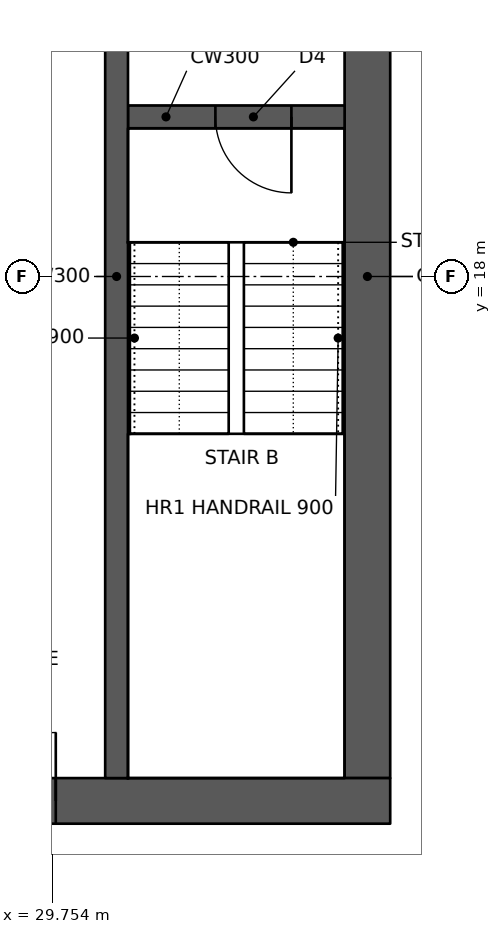
"""IFC4 building model, lengths in metres.
Left out: names, types, materials, properties, quantities, classifications, styles, units other than length and angle.
Written with IfcOpenShell. Run it as: python <this file> out.ifc"""

import sys

from ifc_helpers import new_model, si_unit, direction, frame, frame_2d, origin, place, context, subcontext, project, spatial, rectangle, extrude, element, fill, save


model = new_model("IFC4")
c1 = context("Model", 3, precision=1e-05, world=origin(), true_north=direction((0.0, 1.0)))
c2 = subcontext(c1, "Body", "Model", "MODEL_VIEW")
j1 = project(units=[si_unit("LENGTHUNIT", "METRE"), si_unit("PLANEANGLEUNIT", "RADIAN")], contexts=[c1])
p1 = place(None, origin())
s1 = spatial("IfcSite", under=j1, at=p1, CompositionType="ELEMENT")
p2 = place(p1, origin())
s2 = spatial("IfcBuilding", under=s1, at=p2, CompositionType="ELEMENT")
p3 = place(p2, frame((0.0, 0.0, 194.4)))
s3 = spatial("IfcBuildingStorey", under=s2, at=p3, CompositionType="ELEMENT", Elevation=194.4)
p4 = place(p3, frame((10.8, 11.1, 0.0), z_axis=(0.0, 0.0, 1.0), x_axis=(1.0, 0.0, 0.0)))
e1 = element("IfcWall", 1, at=p4, inside=s3, PredefinedType="SHEAR", context=c2, shape_type="SweptSolid", body=[
    extrude(rectangle(XDim=23.4, YDim=0.6, at=frame_2d((11.7, 0.0))), origin(), (0.0, 0.0, 1.0), 3.4),
])
p5 = place(p4, frame((1.0, 0.0, 0.0)))
e2 = element("IfcOpeningElement", 2, at=p5, cuts=e1, PredefinedType="OPENING", context=c2, shape_type="SweptSolid", body=[
    extrude(rectangle(XDim=1.0, YDim=2.1, at=frame_2d((0.5, 1.05))), frame((0.0, 0.31, 0.0), z_axis=(0.0, -1.0, 0.0), x_axis=(1.0, 0.0, 0.0)), (0.0, 0.0, 1.0), 0.62),
])
p6 = place(p4, frame((17.2, 0.0, 0.0)))
e3 = element("IfcOpeningElement", 3, at=p6, cuts=e1, PredefinedType="OPENING", context=c2, shape_type="SweptSolid", body=[
    extrude(rectangle(XDim=1.8, YDim=2.1, at=frame_2d((0.9, 1.05))), frame((0.0, 0.31, 0.0), z_axis=(0.0, -1.0, 0.0), x_axis=(1.0, 0.0, 0.0)), (0.0, 0.0, 1.0), 0.62),
])
p7 = place(p3, frame((33.9, 11.4, 0.0), z_axis=(0.0, 0.0, 1.0), x_axis=(0.0, 1.0, 0.0)))
e4 = element("IfcWall", 4, at=p7, inside=s3, PredefinedType="SHEAR", context=c2, shape_type="SweptSolid", body=[
    extrude(rectangle(XDim=13.2, YDim=0.6, at=frame_2d((6.6, 0.0))), origin(), (0.0, 0.0, 1.0), 3.4),
])
p8 = place(p3, frame((30.6, 11.4, 0.0), z_axis=(0.0, 0.0, 1.0), x_axis=(0.0, 1.0, 0.0)))
e5 = element("IfcWall", 5, at=p8, inside=s3, PredefinedType="SHEAR", context=c2, shape_type="SweptSolid", body=[
    extrude(rectangle(XDim=13.2, YDim=0.3, at=frame_2d((6.6, 0.0))), origin(), (0.0, 0.0, 1.0), 3.4),
])
p9 = place(p3, frame((30.75, 20.1, 0.0), z_axis=(0.0, 0.0, 1.0), x_axis=(1.0, 0.0, 0.0)))
e6 = element("IfcWall", 6, at=p9, inside=s3, PredefinedType="SHEAR", context=c2, shape_type="SweptSolid", body=[
    extrude(rectangle(XDim=2.85, YDim=0.3, at=frame_2d((1.425, 0.0))), origin(), (0.0, 0.0, 1.0), 3.4),
])
p10 = place(p9, frame((1.15, 0.0, 0.0)))
e7 = element("IfcOpeningElement", 7, at=p10, cuts=e6, PredefinedType="OPENING", context=c2, shape_type="SweptSolid", body=[
    extrude(rectangle(XDim=1.0, YDim=2.1, at=frame_2d((0.5, 1.05))), frame((0.0, 0.16, 0.0), z_axis=(0.0, -1.0, 0.0), x_axis=(1.0, 0.0, 0.0)), (0.0, 0.0, 1.0), 0.32),
])
p11 = place(p6, origin())
e8 = element("IfcDoor", 8, at=p11, inside=s3, OperationType="DOUBLE_DOOR_SINGLE_SWING", PredefinedType="DOOR", context=c2, shape_type="SweptSolid", body=[
    extrude(rectangle(XDim=1.8, YDim=2.1, at=frame_2d((0.9, 1.05))), frame((0.0, 0.025, 0.0), z_axis=(0.0, -1.0, 0.0), x_axis=(1.0, 0.0, 0.0)), (0.0, 0.0, 1.0), 0.05),
])
fill(e3, e8)
p12 = place(p10, frame((1.0, 0.0, 0.0), z_axis=(0.0, 0.0, 1.0), x_axis=(-1.0, 0.0, 0.0)))
e9 = element("IfcDoor", 9, at=p12, inside=s3, OperationType="SINGLE_SWING_LEFT", PredefinedType="DOOR", context=c2, shape_type="SweptSolid", body=[
    extrude(rectangle(XDim=1.0, YDim=2.1, at=frame_2d((0.5, 1.05))), frame((0.0, 0.025, 0.0), z_axis=(0.0, -1.0, 0.0), x_axis=(1.0, 0.0, 0.0)), (0.0, 0.0, 1.0), 0.05),
])
fill(e7, e9)
save(model, sys.argv[1])
